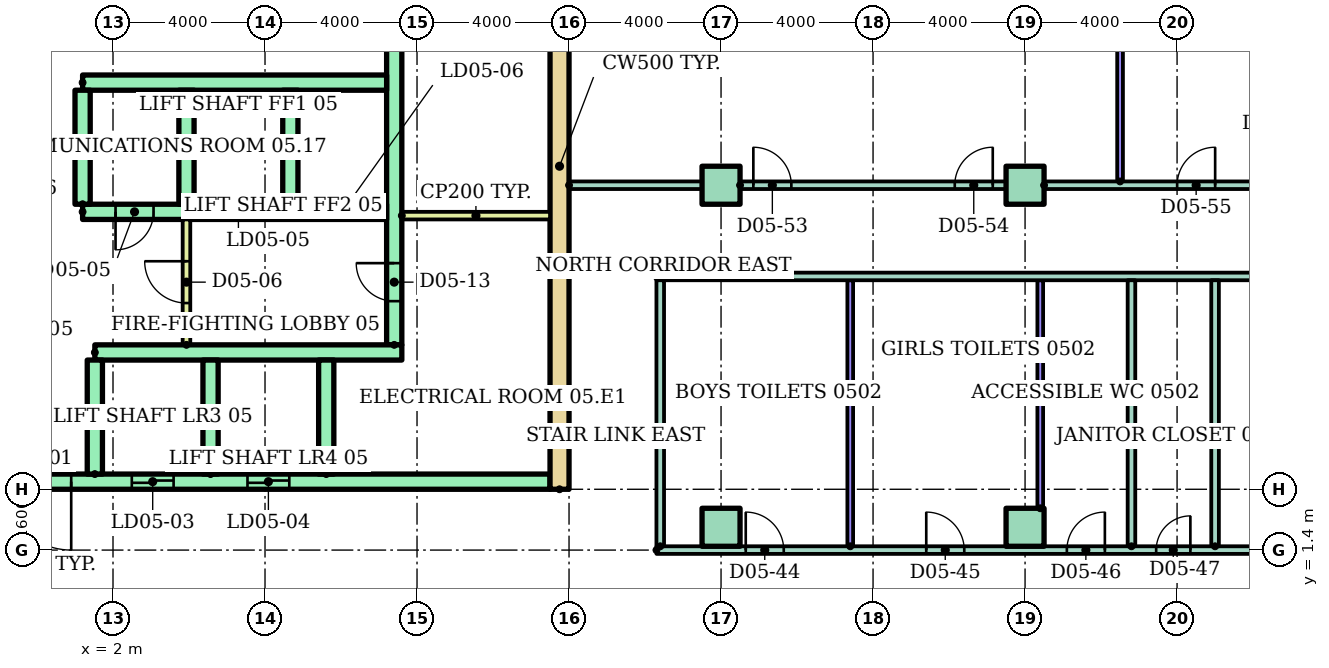
"""IFC4 building model, lengths in metres.
Left out: names, types, materials, properties, quantities, classifications, styles, units other than length and angle.
Written with IfcOpenShell. Run it as: python <this file> out.ifc"""

import sys

from ifc_helpers import new_model, si_unit, direction, frame, frame_2d, origin, origin_2d, place, context, subcontext, project, spatial, rectangle, extrude, element, fill, save


model = new_model("IFC4")
c1 = context("Model", 3, precision=1e-05, world=origin(), true_north=direction((0.0, 1.0)))
c2 = subcontext(c1, "Body", "Model", "MODEL_VIEW")
j1 = project(units=[si_unit("LENGTHUNIT", "METRE"), si_unit("PLANEANGLEUNIT", "RADIAN")], contexts=[c1])
p1 = place(None, origin())
s1 = spatial("IfcSite", under=j1, at=p1, CompositionType="ELEMENT")
p2 = place(p1, origin())
s2 = spatial("IfcBuilding", under=s1, at=p2, CompositionType="ELEMENT")
p3 = place(p2, frame((0.0, 0.0, 22.0)))
s3 = spatial("IfcBuildingStorey", under=s2, at=p3, CompositionType="ELEMENT", Elevation=22.0)
for number, where in (
    (1, (18.0, 2.0, 0.0)),
    (2, (26.0, 2.0, 0.0)),
    (3, (18.0, 11.0, 0.0)),
    (4, (26.0, 11.0, 0.0)),
):
    element("IfcColumn", number, at=place(p3, frame(where)), inside=s3, PredefinedType="COLUMN", context=c2, shape_type="SweptSolid", body=[
        extrude(rectangle(XDim=1.0, YDim=1.0, at=origin_2d()), origin(), (0.0, 0.0, 1.0), 4.0),
    ])
p4 = place(p3, frame((13.75, 3.0, 0.0), z_axis=(0.0, 0.0, 1.0), x_axis=(0.0, 1.0, 0.0)))
e5 = element("IfcWall", 5, at=p4, inside=s3, PredefinedType="SHEAR", context=c2, shape_type="SweptSolid", body=[
    extrude(rectangle(XDim=17.0, YDim=0.5, at=frame_2d((8.5, 0.0))), origin(), (0.0, 0.0, 1.0), 3.2),
])
p5 = place(p3, frame((9.4, 6.8, 0.0), z_axis=(0.0, 0.0, 1.0), x_axis=(0.0, 1.0, 0.0)))
e6 = element("IfcWall", 6, at=p5, inside=s3, PredefinedType="SHEAR", context=c2, shape_type="SweptSolid", body=[
    extrude(rectangle(XDim=12.7, YDim=0.4, at=frame_2d((6.35, 0.0))), origin(), (0.0, 0.0, 1.0), 3.2),
])
p6 = place(p5, frame((1.15, 0.0, 0.0)))
e7 = element("IfcOpeningElement", 7, at=p6, cuts=e6, PredefinedType="OPENING", context=c2, shape_type="SweptSolid", body=[
    extrude(rectangle(XDim=1.0, YDim=2.1, at=frame_2d((0.5, 1.05))), frame((0.0, 0.21, 0.0), z_axis=(0.0, -1.0, 0.0), x_axis=(1.0, 0.0, 0.0)), (0.0, 0.0, 1.0), 0.42),
])
p7 = place(p5, frame((7.925, 0.0, 0.0)))
e8 = element("IfcOpeningElement", 8, at=p7, cuts=e6, PredefinedType="OPENING", context=c2, shape_type="SweptSolid", body=[
    extrude(rectangle(XDim=1.0, YDim=2.1, at=frame_2d((0.5, 1.05))), frame((0.0, 0.21, 0.0), z_axis=(0.0, -1.0, 0.0), x_axis=(1.0, 0.0, 0.0)), (0.0, 0.0, 1.0), 0.42),
])
p8 = place(p3, frame((-13.5, 3.2, 0.0)))
e9 = element("IfcWall", 9, at=p8, inside=s3, PredefinedType="SHEAR", context=c2, shape_type="SweptSolid", body=[
    extrude(rectangle(XDim=27.0, YDim=0.4, at=frame_2d((13.5, 0.0))), origin(), (0.0, 0.0, 1.0), 3.2),
])
p9 = place(p8, frame((6.861, 0.0, 0.0)))
e10 = element("IfcOpeningElement", 10, at=p9, cuts=e9, PredefinedType="OPENING", context=c2, shape_type="SweptSolid", body=[
    extrude(rectangle(XDim=1.1, YDim=2.1, at=frame_2d((0.55, 1.05))), frame((0.0, 0.21, 0.0), z_axis=(0.0, -1.0, 0.0), x_axis=(1.0, 0.0, 0.0)), (0.0, 0.0, 1.0), 0.42),
])
p10 = place(p8, frame((9.906, 0.0, 0.0)))
e11 = element("IfcOpeningElement", 11, at=p10, cuts=e9, PredefinedType="OPENING", context=c2, shape_type="SweptSolid", body=[
    extrude(rectangle(XDim=1.1, YDim=2.1, at=frame_2d((0.55, 1.05))), frame((0.0, 0.21, 0.0), z_axis=(0.0, -1.0, 0.0), x_axis=(1.0, 0.0, 0.0)), (0.0, 0.0, 1.0), 0.42),
])
p11 = place(p8, frame((15.994, 0.0, 0.0)))
e12 = element("IfcOpeningElement", 12, at=p11, cuts=e9, PredefinedType="OPENING", context=c2, shape_type="SweptSolid", body=[
    extrude(rectangle(XDim=1.1, YDim=2.1, at=frame_2d((0.55, 1.05))), frame((0.0, 0.21, 0.0), z_axis=(0.0, -1.0, 0.0), x_axis=(1.0, 0.0, 0.0)), (0.0, 0.0, 1.0), 0.42),
])
p12 = place(p8, frame((19.039, 0.0, 0.0)))
e13 = element("IfcOpeningElement", 13, at=p12, cuts=e9, PredefinedType="OPENING", context=c2, shape_type="SweptSolid", body=[
    extrude(rectangle(XDim=1.1, YDim=2.1, at=frame_2d((0.55, 1.05))), frame((0.0, 0.21, 0.0), z_axis=(0.0, -1.0, 0.0), x_axis=(1.0, 0.0, 0.0)), (0.0, 0.0, 1.0), 0.42),
])
p13 = place(p8, frame((12.6, 0.0, 0.0)))
e14 = element("IfcOpeningElement", 14, at=p13, cuts=e9, PredefinedType="OPENING", context=c2, shape_type="SweptSolid", body=[
    extrude(rectangle(XDim=1.8, YDim=2.1, at=frame_2d((0.9, 1.05))), frame((0.0, 0.21, 0.0), z_axis=(0.0, -1.0, 0.0), x_axis=(1.0, 0.0, 0.0)), (0.0, 0.0, 1.0), 0.42),
])
p14 = place(p3, frame((1.522, 6.6, 0.0)))
e15 = element("IfcWall", 15, at=p14, inside=s3, PredefinedType="SHEAR", context=c2, shape_type="SweptSolid", body=[
    extrude(rectangle(XDim=8.078, YDim=0.4, at=frame_2d((4.039, 0.0))), origin(), (0.0, 0.0, 1.0), 3.2),
])
for number, where, z_axis, x_axis in (
    (16, (1.522, 3.4, 0.0), (0.0, 0.0, 1.0), (0.0, 1.0, 0.0)),
    (17, (4.567, 3.4, 0.0), (0.0, 0.0, 1.0), (0.0, 1.0, 0.0)),
    (18, (7.611, 3.4, 0.0), (0.0, 0.0, 1.0), (0.0, 1.0, 0.0)),
):
    element("IfcWall", number, at=place(p3, frame(where, z_axis=z_axis, x_axis=x_axis)), inside=s3, PredefinedType="SHEAR", context=c2, shape_type="SweptSolid", body=[
        extrude(rectangle(XDim=3.0, YDim=0.4, at=frame_2d((1.5, 0.0))), origin(), (0.0, 0.0, 1.0), 3.2),
    ])
p15 = place(p3, frame((1.2, 10.3, 0.0)))
e19 = element("IfcWall", 19, at=p15, inside=s3, PredefinedType="SHEAR", context=c2, shape_type="SweptSolid", body=[
    extrude(rectangle(XDim=8.0, YDim=0.4, at=frame_2d((4.0, 0.0))), origin(), (0.0, 0.0, 1.0), 3.2),
])
p16 = place(p15, frame((3.55, 0.0, 0.0)))
e20 = element("IfcOpeningElement", 20, at=p16, cuts=e19, PredefinedType="OPENING", context=c2, shape_type="SweptSolid", body=[
    extrude(rectangle(XDim=1.1, YDim=2.1, at=frame_2d((0.55, 1.05))), frame((0.0, 0.21, 0.0), z_axis=(0.0, -1.0, 0.0), x_axis=(1.0, 0.0, 0.0)), (0.0, 0.0, 1.0), 0.42),
])
p17 = place(p15, frame((6.283, 0.0, 0.0)))
e21 = element("IfcOpeningElement", 21, at=p17, cuts=e19, PredefinedType="OPENING", context=c2, shape_type="SweptSolid", body=[
    extrude(rectangle(XDim=1.1, YDim=2.1, at=frame_2d((0.55, 1.05))), frame((0.0, 0.21, 0.0), z_axis=(0.0, -1.0, 0.0), x_axis=(1.0, 0.0, 0.0)), (0.0, 0.0, 1.0), 0.42),
])
p18 = place(p15, frame((0.867, 0.0, 0.0)))
e22 = element("IfcOpeningElement", 22, at=p18, cuts=e19, PredefinedType="OPENING", context=c2, shape_type="SweptSolid", body=[
    extrude(rectangle(XDim=1.0, YDim=2.1, at=frame_2d((0.5, 1.05))), frame((0.0, 0.21, 0.0), z_axis=(0.0, -1.0, 0.0), x_axis=(1.0, 0.0, 0.0)), (0.0, 0.0, 1.0), 0.42),
])
p19 = place(p3, frame((1.2, 13.7, 0.0)))
e23 = element("IfcWall", 23, at=p19, inside=s3, PredefinedType="SHEAR", context=c2, shape_type="SweptSolid", body=[
    extrude(rectangle(XDim=8.0, YDim=0.4, at=frame_2d((4.0, 0.0))), origin(), (0.0, 0.0, 1.0), 3.2),
])
for number, where, z_axis, x_axis in (
    (24, (1.2, 10.5, 0.0), (0.0, 0.0, 1.0), (0.0, 1.0, 0.0)),
    (25, (3.933, 10.5, 0.0), (0.0, 0.0, 1.0), (0.0, 1.0, 0.0)),
    (26, (6.667, 10.5, 0.0), (0.0, 0.0, 1.0), (0.0, 1.0, 0.0)),
):
    element("IfcWall", number, at=place(p3, frame(where, z_axis=z_axis, x_axis=x_axis)), inside=s3, PredefinedType="SHEAR", context=c2, shape_type="SweptSolid", body=[
        extrude(rectangle(XDim=3.0, YDim=0.4, at=frame_2d((1.5, 0.0))), origin(), (0.0, 0.0, 1.0), 3.2),
    ])
p20 = place(p3, frame((3.933, 6.8, 0.0), z_axis=(0.0, 0.0, 1.0), x_axis=(0.0, 1.0, 0.0)))
e27 = element("IfcWall", 27, at=p20, inside=s3, PredefinedType="PARTITIONING", context=c2, shape_type="SweptSolid", body=[
    extrude(rectangle(XDim=3.3, YDim=0.2, at=frame_2d((1.65, 0.0))), origin(), (0.0, 0.0, 1.0), 3.2),
])
p21 = place(p20, frame((1.1, 0.0, 0.0)))
e28 = element("IfcOpeningElement", 28, at=p21, cuts=e27, PredefinedType="OPENING", context=c2, shape_type="SweptSolid", body=[
    extrude(rectangle(XDim=1.1, YDim=2.1, at=frame_2d((0.55, 1.05))), frame((0.0, 0.11, 0.0), z_axis=(0.0, -1.0, 0.0), x_axis=(1.0, 0.0, 0.0)), (0.0, 0.0, 1.0), 0.22),
])
p22 = place(p3, frame((9.6, 10.2, 0.0)))
e29 = element("IfcWall", 29, at=p22, inside=s3, PredefinedType="PARTITIONING", context=c2, shape_type="SweptSolid", body=[
    extrude(rectangle(XDim=3.9, YDim=0.2, at=frame_2d((1.95, 0.0))), origin(), (0.0, 0.0, 1.0), 3.2),
])
p23 = place(p3, frame((16.3, 1.4, 0.0)))
e30 = element("IfcWall", 30, at=p23, inside=s3, PredefinedType="PARTITIONING", context=c2, shape_type="SweptSolid", body=[
    extrude(rectangle(XDim=20.6, YDim=0.2, at=frame_2d((10.3, 0.0))), origin(), (0.0, 0.0, 1.0), 3.2),
])
p24 = place(p23, frame((2.35, 0.0, 0.0)))
e31 = element("IfcOpeningElement", 31, at=p24, cuts=e30, PredefinedType="OPENING", context=c2, shape_type="SweptSolid", body=[
    extrude(rectangle(XDim=1.0, YDim=2.1, at=frame_2d((0.5, 1.05))), frame((0.0, 0.11, 0.0), z_axis=(0.0, -1.0, 0.0), x_axis=(1.0, 0.0, 0.0)), (0.0, 0.0, 1.0), 0.22),
])
p25 = place(p23, frame((7.1, 0.0, 0.0)))
e32 = element("IfcOpeningElement", 32, at=p25, cuts=e30, PredefinedType="OPENING", context=c2, shape_type="SweptSolid", body=[
    extrude(rectangle(XDim=1.0, YDim=2.1, at=frame_2d((0.5, 1.05))), frame((0.0, 0.11, 0.0), z_axis=(0.0, -1.0, 0.0), x_axis=(1.0, 0.0, 0.0)), (0.0, 0.0, 1.0), 0.22),
])
p26 = place(p23, frame((10.8, 0.0, 0.0)))
e33 = element("IfcOpeningElement", 33, at=p26, cuts=e30, PredefinedType="OPENING", context=c2, shape_type="SweptSolid", body=[
    extrude(rectangle(XDim=1.0, YDim=2.1, at=frame_2d((0.5, 1.05))), frame((0.0, 0.11, 0.0), z_axis=(0.0, -1.0, 0.0), x_axis=(1.0, 0.0, 0.0)), (0.0, 0.0, 1.0), 0.22),
])
p27 = place(p23, frame((13.15, 0.0, 0.0)))
e34 = element("IfcOpeningElement", 34, at=p27, cuts=e30, PredefinedType="OPENING", context=c2, shape_type="SweptSolid", body=[
    extrude(rectangle(XDim=0.9, YDim=2.1, at=frame_2d((0.45, 1.05))), frame((0.0, 0.11, 0.0), z_axis=(0.0, -1.0, 0.0), x_axis=(1.0, 0.0, 0.0)), (0.0, 0.0, 1.0), 0.22),
])
p28 = place(p3, frame((16.3, 8.6, 0.0)))
e35 = element("IfcWall", 35, at=p28, inside=s3, PredefinedType="PARTITIONING", context=c2, shape_type="SweptSolid", body=[
    extrude(rectangle(XDim=21.3, YDim=0.2, at=frame_2d((10.65, 0.0))), origin(), (0.0, 0.0, 1.0), 3.2),
])
p29 = place(p3, frame((14.0, 11.0, 0.0)))
e36 = element("IfcWall", 36, at=p29, inside=s3, PredefinedType="PARTITIONING", context=c2, shape_type="SweptSolid", body=[
    extrude(rectangle(XDim=3.5, YDim=0.2, at=frame_2d((1.75, 0.0))), origin(), (0.0, 0.0, 1.0), 3.2),
])
p30 = place(p3, frame((18.5, 11.0, 0.0)))
e37 = element("IfcWall", 37, at=p30, inside=s3, PredefinedType="PARTITIONING", context=c2, shape_type="SweptSolid", body=[
    extrude(rectangle(XDim=7.0, YDim=0.2, at=frame_2d((3.5, 0.0))), origin(), (0.0, 0.0, 1.0), 3.2),
])
p31 = place(p30, frame((0.35, 0.0, 0.0)))
e38 = element("IfcOpeningElement", 38, at=p31, cuts=e37, PredefinedType="OPENING", context=c2, shape_type="SweptSolid", body=[
    extrude(rectangle(XDim=1.0, YDim=2.1, at=frame_2d((0.5, 1.05))), frame((0.0, 0.11, 0.0), z_axis=(0.0, -1.0, 0.0), x_axis=(1.0, 0.0, 0.0)), (0.0, 0.0, 1.0), 0.22),
])
p32 = place(p30, frame((5.65, 0.0, 0.0)))
e39 = element("IfcOpeningElement", 39, at=p32, cuts=e37, PredefinedType="OPENING", context=c2, shape_type="SweptSolid", body=[
    extrude(rectangle(XDim=1.0, YDim=2.1, at=frame_2d((0.5, 1.05))), frame((0.0, 0.11, 0.0), z_axis=(0.0, -1.0, 0.0), x_axis=(1.0, 0.0, 0.0)), (0.0, 0.0, 1.0), 0.22),
])
p33 = place(p3, frame((26.5, 11.0, 0.0)))
e40 = element("IfcWall", 40, at=p33, inside=s3, PredefinedType="PARTITIONING", context=c2, shape_type="SweptSolid", body=[
    extrude(rectangle(XDim=7.0, YDim=0.2, at=frame_2d((3.5, 0.0))), origin(), (0.0, 0.0, 1.0), 3.2),
])
p34 = place(p33, frame((3.502, 0.0, 0.0)))
e41 = element("IfcOpeningElement", 41, at=p34, cuts=e40, PredefinedType="OPENING", context=c2, shape_type="SweptSolid", body=[
    extrude(rectangle(XDim=1.0, YDim=2.1, at=frame_2d((0.5, 1.05))), frame((0.0, 0.11, 0.0), z_axis=(0.0, -1.0, 0.0), x_axis=(1.0, 0.0, 0.0)), (0.0, 0.0, 1.0), 0.22),
])
p35 = place(p33, frame((5.65, 0.0, 0.0)))
e42 = element("IfcOpeningElement", 42, at=p35, cuts=e40, PredefinedType="OPENING", context=c2, shape_type="SweptSolid", body=[
    extrude(rectangle(XDim=1.0, YDim=2.1, at=frame_2d((0.5, 1.05))), frame((0.0, 0.11, 0.0), z_axis=(0.0, -1.0, 0.0), x_axis=(1.0, 0.0, 0.0)), (0.0, 0.0, 1.0), 0.22),
])
p36 = place(p3, frame((16.4, 1.5, 0.0), z_axis=(0.0, 0.0, 1.0), x_axis=(0.0, 1.0, 0.0)))
e43 = element("IfcWall", 43, at=p36, inside=s3, PredefinedType="PARTITIONING", context=c2, shape_type="SweptSolid", body=[
    extrude(rectangle(XDim=7.0, YDim=0.2, at=frame_2d((3.5, 0.0))), origin(), (0.0, 0.0, 1.0), 3.2),
])
p37 = place(p3, frame((21.4, 1.5, 0.0), z_axis=(0.0, 0.0, 1.0), x_axis=(0.0, 1.0, 0.0)))
e44 = element("IfcWall", 44, at=p37, inside=s3, PredefinedType="PARTITIONING", context=c2, shape_type="SweptSolid", body=[
    extrude(rectangle(XDim=7.0, YDim=0.15, at=frame_2d((3.5, 0.0))), origin(), (0.0, 0.0, 1.0), 3.2),
])
p38 = place(p3, frame((26.4, 2.5, 0.0), z_axis=(0.0, 0.0, 1.0), x_axis=(0.0, 1.0, 0.0)))
e45 = element("IfcWall", 45, at=p38, inside=s3, PredefinedType="PARTITIONING", context=c2, shape_type="SweptSolid", body=[
    extrude(rectangle(XDim=6.0, YDim=0.15, at=frame_2d((3.0, 0.0))), origin(), (0.0, 0.0, 1.0), 3.2),
])
p39 = place(p3, frame((28.5, 11.1, 0.0), z_axis=(0.0, 0.0, 1.0), x_axis=(0.0, 1.0, 0.0)))
e46 = element("IfcWall", 46, at=p39, inside=s3, PredefinedType="PARTITIONING", context=c2, shape_type="SweptSolid", body=[
    extrude(rectangle(XDim=8.5, YDim=0.15, at=frame_2d((4.25, 0.0))), origin(), (0.0, 0.0, 1.0), 3.2),
])
for number, where, z_axis, x_axis in (
    (47, (28.8, 1.5, 0.0), (0.0, 0.0, 1.0), (0.0, 1.0, 0.0)),
    (48, (31.0, 1.5, 0.0), (0.0, 0.0, 1.0), (0.0, 1.0, 0.0)),
):
    element("IfcWall", number, at=place(p3, frame(where, z_axis=z_axis, x_axis=x_axis)), inside=s3, PredefinedType="PARTITIONING", context=c2, shape_type="SweptSolid", body=[
        extrude(rectangle(XDim=7.0, YDim=0.2, at=frame_2d((3.5, 0.0))), origin(), (0.0, 0.0, 1.0), 3.2),
    ])
p40 = place(p11, origin())
e49 = element("IfcDoor", 49, at=p40, inside=s3, OperationType="SLIDING_TO_LEFT", PredefinedType="DOOR", context=c2, shape_type="SweptSolid", body=[
    extrude(rectangle(XDim=1.1, YDim=2.1, at=frame_2d((0.55, 1.05))), frame((0.0, 0.025, 0.0), z_axis=(0.0, -1.0, 0.0), x_axis=(1.0, 0.0, 0.0)), (0.0, 0.0, 1.0), 0.05),
])
fill(e12, e49)
p41 = place(p12, origin())
e50 = element("IfcDoor", 50, at=p41, inside=s3, OperationType="SLIDING_TO_LEFT", PredefinedType="DOOR", context=c2, shape_type="SweptSolid", body=[
    extrude(rectangle(XDim=1.1, YDim=2.1, at=frame_2d((0.55, 1.05))), frame((0.0, 0.025, 0.0), z_axis=(0.0, -1.0, 0.0), x_axis=(1.0, 0.0, 0.0)), (0.0, 0.0, 1.0), 0.05),
])
fill(e13, e50)
p42 = place(p13, frame((1.8, 0.0, 0.0), z_axis=(0.0, 0.0, 1.0), x_axis=(-1.0, 0.0, 0.0)))
e51 = element("IfcDoor", 51, at=p42, inside=s3, OperationType="DOUBLE_DOOR_SINGLE_SWING", PredefinedType="DOOR", context=c2, shape_type="SweptSolid", body=[
    extrude(rectangle(XDim=1.8, YDim=2.1, at=frame_2d((0.9, 1.05))), frame((0.0, 0.025, 0.0), z_axis=(0.0, -1.0, 0.0), x_axis=(1.0, 0.0, 0.0)), (0.0, 0.0, 1.0), 0.05),
])
fill(e14, e51)
p43 = place(p16, origin())
e52 = element("IfcDoor", 52, at=p43, inside=s3, OperationType="SLIDING_TO_LEFT", PredefinedType="DOOR", context=c2, shape_type="SweptSolid", body=[
    extrude(rectangle(XDim=1.1, YDim=2.1, at=frame_2d((0.55, 1.05))), frame((0.0, 0.025, 0.0), z_axis=(0.0, -1.0, 0.0), x_axis=(1.0, 0.0, 0.0)), (0.0, 0.0, 1.0), 0.05),
])
fill(e20, e52)
p44 = place(p17, origin())
e53 = element("IfcDoor", 53, at=p44, inside=s3, OperationType="SLIDING_TO_LEFT", PredefinedType="DOOR", context=c2, shape_type="SweptSolid", body=[
    extrude(rectangle(XDim=1.1, YDim=2.1, at=frame_2d((0.55, 1.05))), frame((0.0, 0.025, 0.0), z_axis=(0.0, -1.0, 0.0), x_axis=(1.0, 0.0, 0.0)), (0.0, 0.0, 1.0), 0.05),
])
fill(e21, e53)
p45 = place(p18, frame((1.0, 0.0, 0.0), z_axis=(0.0, 0.0, 1.0), x_axis=(-1.0, 0.0, 0.0)))
e54 = element("IfcDoor", 54, at=p45, inside=s3, OperationType="SINGLE_SWING_LEFT", PredefinedType="DOOR", context=c2, shape_type="SweptSolid", body=[
    extrude(rectangle(XDim=1.0, YDim=2.1, at=frame_2d((0.5, 1.05))), frame((0.0, 0.025, 0.0), z_axis=(0.0, -1.0, 0.0), x_axis=(1.0, 0.0, 0.0)), (0.0, 0.0, 1.0), 0.05),
])
fill(e22, e54)
p46 = place(p21, origin())
e55 = element("IfcDoor", 55, at=p46, inside=s3, OperationType="SINGLE_SWING_RIGHT", PredefinedType="DOOR", context=c2, shape_type="SweptSolid", body=[
    extrude(rectangle(XDim=1.1, YDim=2.1, at=frame_2d((0.55, 1.05))), frame((0.0, 0.025, 0.0), z_axis=(0.0, -1.0, 0.0), x_axis=(1.0, 0.0, 0.0)), (0.0, 0.0, 1.0), 0.05),
])
fill(e28, e55)
p47 = place(p6, origin())
e56 = element("IfcDoor", 56, at=p47, inside=s3, OperationType="SINGLE_SWING_RIGHT", PredefinedType="DOOR", context=c2, shape_type="SweptSolid", body=[
    extrude(rectangle(XDim=1.0, YDim=2.1, at=frame_2d((0.5, 1.05))), frame((0.0, 0.025, 0.0), z_axis=(0.0, -1.0, 0.0), x_axis=(1.0, 0.0, 0.0)), (0.0, 0.0, 1.0), 0.05),
])
fill(e7, e56)
p48 = place(p24, origin())
e57 = element("IfcDoor", 57, at=p48, inside=s3, OperationType="SINGLE_SWING_LEFT", PredefinedType="DOOR", context=c2, shape_type="SweptSolid", body=[
    extrude(rectangle(XDim=1.0, YDim=2.1, at=frame_2d((0.5, 1.05))), frame((0.0, 0.025, 0.0), z_axis=(0.0, -1.0, 0.0), x_axis=(1.0, 0.0, 0.0)), (0.0, 0.0, 1.0), 0.05),
])
fill(e31, e57)
p49 = place(p25, origin())
e58 = element("IfcDoor", 58, at=p49, inside=s3, OperationType="SINGLE_SWING_LEFT", PredefinedType="DOOR", context=c2, shape_type="SweptSolid", body=[
    extrude(rectangle(XDim=1.0, YDim=2.1, at=frame_2d((0.5, 1.05))), frame((0.0, 0.025, 0.0), z_axis=(0.0, -1.0, 0.0), x_axis=(1.0, 0.0, 0.0)), (0.0, 0.0, 1.0), 0.05),
])
fill(e32, e58)
p50 = place(p26, origin())
e59 = element("IfcDoor", 59, at=p50, inside=s3, OperationType="SINGLE_SWING_RIGHT", PredefinedType="DOOR", context=c2, shape_type="SweptSolid", body=[
    extrude(rectangle(XDim=1.0, YDim=2.1, at=frame_2d((0.5, 1.05))), frame((0.0, 0.025, 0.0), z_axis=(0.0, -1.0, 0.0), x_axis=(1.0, 0.0, 0.0)), (0.0, 0.0, 1.0), 0.05),
])
fill(e33, e59)
p51 = place(p27, origin())
e60 = element("IfcDoor", 60, at=p51, inside=s3, OperationType="SINGLE_SWING_RIGHT", PredefinedType="DOOR", context=c2, shape_type="SweptSolid", body=[
    extrude(rectangle(XDim=0.9, YDim=2.1, at=frame_2d((0.45, 1.05))), frame((0.0, 0.025, 0.0), z_axis=(0.0, -1.0, 0.0), x_axis=(1.0, 0.0, 0.0)), (0.0, 0.0, 1.0), 0.05),
])
fill(e34, e60)
p52 = place(p31, origin())
e61 = element("IfcDoor", 61, at=p52, inside=s3, OperationType="SINGLE_SWING_LEFT", PredefinedType="DOOR", context=c2, shape_type="SweptSolid", body=[
    extrude(rectangle(XDim=1.0, YDim=2.1, at=frame_2d((0.5, 1.05))), frame((0.0, 0.025, 0.0), z_axis=(0.0, -1.0, 0.0), x_axis=(1.0, 0.0, 0.0)), (0.0, 0.0, 1.0), 0.05),
])
fill(e38, e61)
p53 = place(p32, origin())
e62 = element("IfcDoor", 62, at=p53, inside=s3, OperationType="SINGLE_SWING_RIGHT", PredefinedType="DOOR", context=c2, shape_type="SweptSolid", body=[
    extrude(rectangle(XDim=1.0, YDim=2.1, at=frame_2d((0.5, 1.05))), frame((0.0, 0.025, 0.0), z_axis=(0.0, -1.0, 0.0), x_axis=(1.0, 0.0, 0.0)), (0.0, 0.0, 1.0), 0.05),
])
fill(e39, e62)
p54 = place(p34, origin())
e63 = element("IfcDoor", 63, at=p54, inside=s3, OperationType="SINGLE_SWING_RIGHT", PredefinedType="DOOR", context=c2, shape_type="SweptSolid", body=[
    extrude(rectangle(XDim=1.0, YDim=2.1, at=frame_2d((0.5, 1.05))), frame((0.0, 0.025, 0.0), z_axis=(0.0, -1.0, 0.0), x_axis=(1.0, 0.0, 0.0)), (0.0, 0.0, 1.0), 0.05),
])
fill(e41, e63)
save(model, sys.argv[1])
